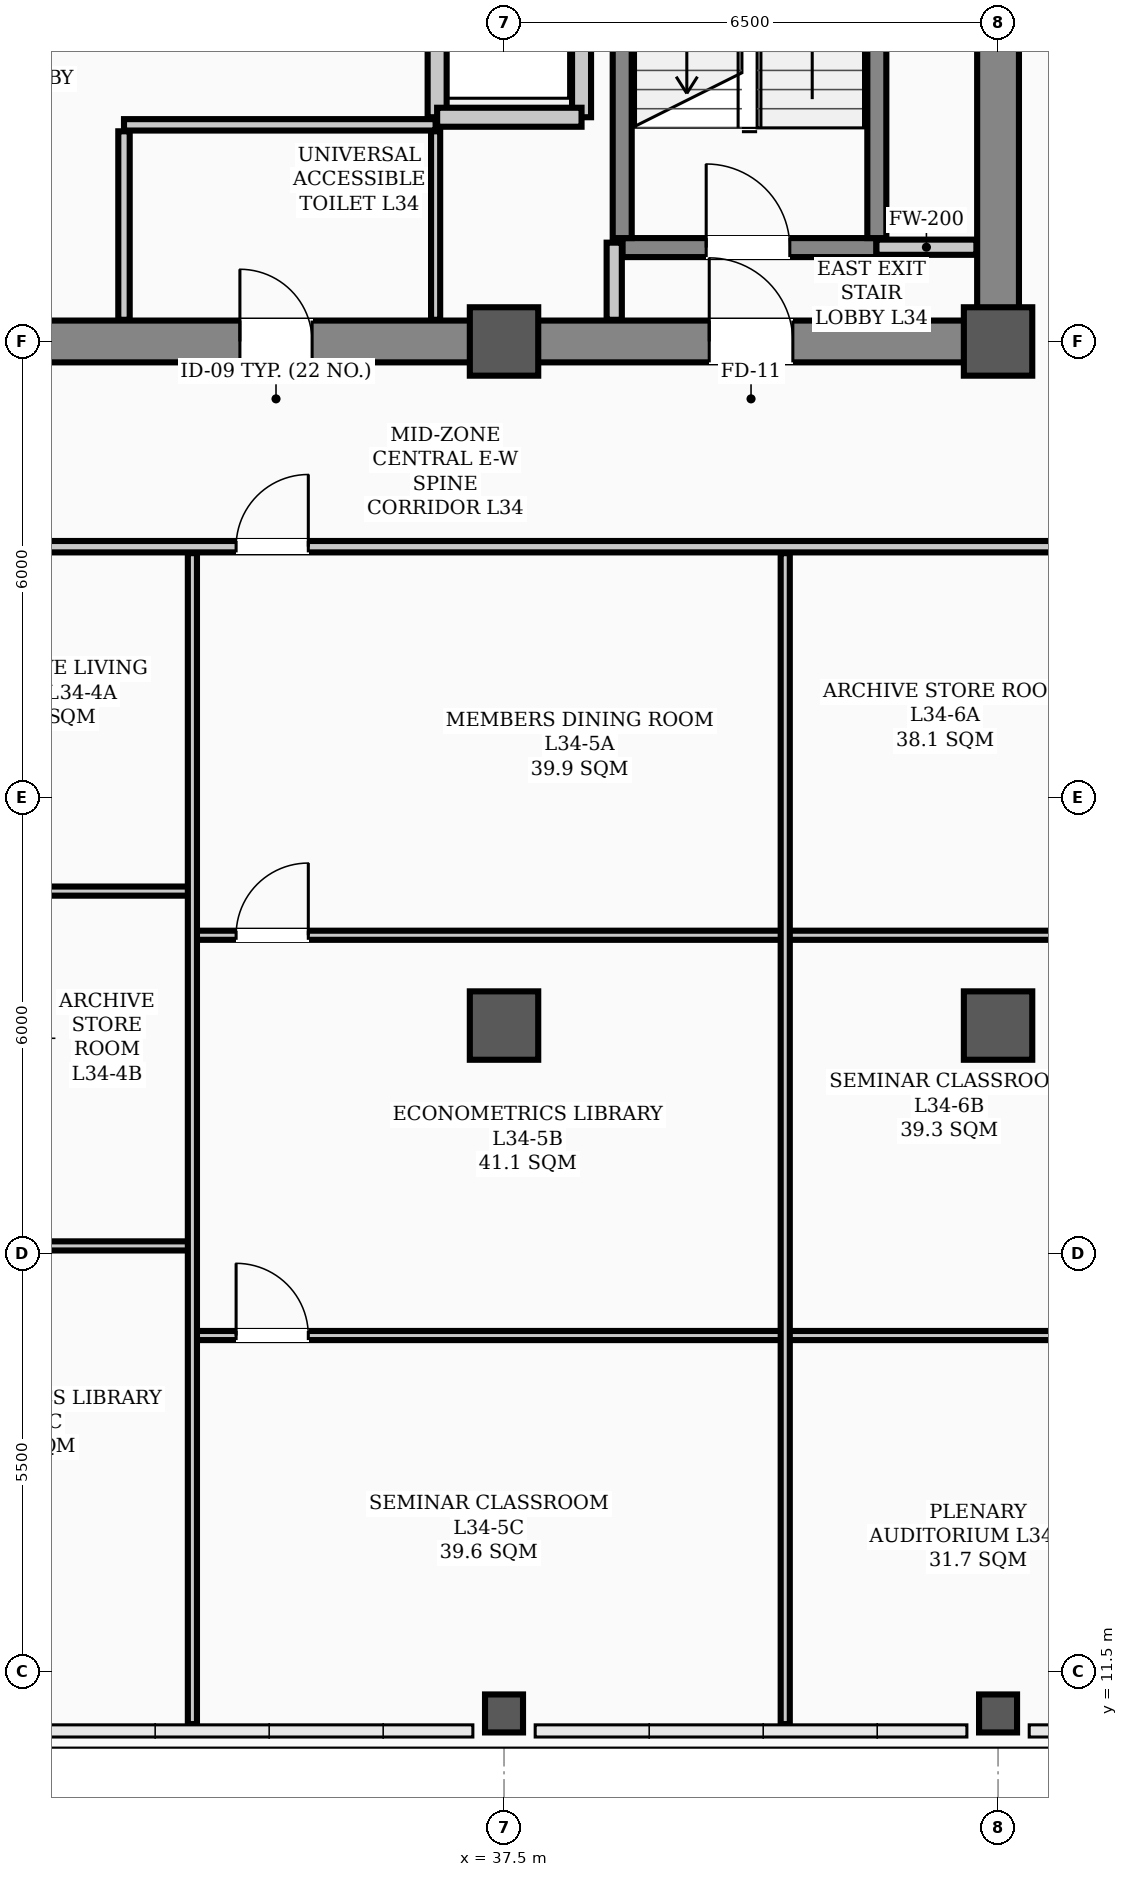
"""IFC4 building model, lengths in metres.
Left out: names, types, materials, properties, quantities, classifications, styles, units other than length and angle.
Written with IfcOpenShell. Run it as: python <this file> out.ifc"""

import sys

from ifc_helpers import new_model, si_unit, direction, frame, frame_2d, origin, origin_2d, place, context, subcontext, project, spatial, rectangle, hollow_rectangle, extrude, element, fill, save


model = new_model("IFC4")
c1 = context("Model", 3, precision=1e-05, world=origin(), true_north=direction((0.0, 1.0)))
c2 = subcontext(c1, "Body", "Model", "MODEL_VIEW")
j1 = project(units=[si_unit("LENGTHUNIT", "METRE"), si_unit("PLANEANGLEUNIT", "RADIAN")], contexts=[c1])
p1 = place(None, origin())
s1 = spatial("IfcSite", under=j1, at=p1, CompositionType="ELEMENT")
p2 = place(p1, origin())
s2 = spatial("IfcBuilding", under=s1, at=p2, CompositionType="ELEMENT")
p3 = place(p2, frame((0.0, 0.0, 138.3)))
s3 = spatial("IfcBuildingStorey", under=s2, at=p3, CompositionType="ELEMENT", Elevation=138.3)
for number, where, z_axis, x_axis in (
    (1, (37.5, 29.0, 0.0), (0.0, 0.0, 1.0), (1.0, 0.0, 0.0)),
    (2, (44.0, 29.0, 0.0), (0.0, 0.0, 1.0), (1.0, 0.0, 0.0)),
    (3, (37.5, 20.0, 0.0), (0.0, 0.0, 1.0), (1.0, 0.0, 0.0)),
    (4, (44.0, 20.0, 0.0), (0.0, 0.0, 1.0), (1.0, 0.0, 0.0)),
):
    element("IfcColumn", number, at=place(p3, frame(where, z_axis=z_axis, x_axis=x_axis)), inside=s3, PredefinedType="COLUMN", context=c2, shape_type="SweptSolid", body=[
        extrude(hollow_rectangle(XDim=0.9, YDim=0.9, WallThickness=0.035, InnerFilletRadius=0.017, OuterFilletRadius=0.052, at=origin_2d()), origin(), (0.0, 0.0, 1.0), 3.9),
    ])
for number, where, z_axis, x_axis in (
    (5, (37.5, 10.95, 0.0), (0.0, 0.0, 1.0), (1.0, 0.0, 0.0)),
    (6, (44.0, 10.95, 0.0), (0.0, 0.0, 1.0), (1.0, 0.0, 0.0)),
):
    element("IfcColumn", number, at=place(p3, frame(where, z_axis=z_axis, x_axis=x_axis)), inside=s3, PredefinedType="COLUMN", context=c2, shape_type="SweptSolid", body=[
        extrude(hollow_rectangle(XDim=0.5, YDim=0.5, WallThickness=0.024, InnerFilletRadius=0.012, OuterFilletRadius=0.036, at=origin_2d()), origin(), (0.0, 0.0, 1.0), 3.66),
    ])
p4 = place(p3, frame((13.5, 29.0, 0.0), z_axis=(0.0, 0.0, 1.0), x_axis=(1.0, 0.0, 0.0)))
e7 = element("IfcWall", 7, at=p4, inside=s3, PredefinedType="SHEAR", context=c2, shape_type="SweptSolid", body=[
    extrude(rectangle(XDim=30.5, YDim=0.55, at=frame_2d((15.25, 0.0))), origin(), (0.0, 0.0, 1.0), 3.66),
])
p5 = place(p4, frame((1.75, 0.0, 0.0)))
e8 = element("IfcOpeningElement", 8, at=p5, cuts=e7, PredefinedType="OPENING", context=c2, shape_type="SweptSolid", body=[
    extrude(rectangle(XDim=1.1, YDim=2.08, at=frame_2d((0.55, 1.04))), frame((0.0, 0.285, 0.0), z_axis=(0.0, -1.0, 0.0), x_axis=(1.0, 0.0, 0.0)), (0.0, 0.0, 1.0), 0.57),
])
p6 = place(p4, frame((26.7, 0.0, 0.0)))
e9 = element("IfcOpeningElement", 9, at=p6, cuts=e7, PredefinedType="OPENING", context=c2, shape_type="SweptSolid", body=[
    extrude(rectangle(XDim=1.1, YDim=2.08, at=frame_2d((0.55, 1.04))), frame((0.0, 0.285, 0.0), z_axis=(0.0, -1.0, 0.0), x_axis=(1.0, 0.0, 0.0)), (0.0, 0.0, 1.0), 0.57),
])
p7 = place(p4, frame((6.8, 0.0, 0.0)))
e10 = element("IfcOpeningElement", 10, at=p7, cuts=e7, PredefinedType="OPENING", context=c2, shape_type="SweptSolid", body=[
    extrude(rectangle(XDim=1.1, YDim=2.08, at=frame_2d((0.55, 1.04))), frame((0.0, 0.285, 0.0), z_axis=(0.0, -1.0, 0.0), x_axis=(1.0, 0.0, 0.0)), (0.0, 0.0, 1.0), 0.57),
])
p8 = place(p4, frame((13.2, 0.0, 0.0)))
e11 = element("IfcOpeningElement", 11, at=p8, cuts=e7, PredefinedType="OPENING", context=c2, shape_type="SweptSolid", body=[
    extrude(rectangle(XDim=1.6, YDim=2.08, at=frame_2d((0.8, 1.04))), frame((0.0, 0.285, 0.0), z_axis=(0.0, -1.0, 0.0), x_axis=(1.0, 0.0, 0.0)), (0.0, 0.0, 1.0), 0.57),
])
p9 = place(p4, frame((20.525, 0.0, 0.0)))
e12 = element("IfcOpeningElement", 12, at=p9, cuts=e7, PredefinedType="OPENING", context=c2, shape_type="SweptSolid", body=[
    extrude(rectangle(XDim=0.95, YDim=2.08, at=frame_2d((0.475, 1.04))), frame((0.0, 0.285, 0.0), z_axis=(0.0, -1.0, 0.0), x_axis=(1.0, 0.0, 0.0)), (0.0, 0.0, 1.0), 0.57),
])
p10 = place(p3, frame((44.0, 29.35, 0.0), z_axis=(0.0, 0.0, 1.0), x_axis=(0.0, 1.0, 0.0)))
e13 = element("IfcWall", 13, at=p10, inside=s3, PredefinedType="SHEAR", context=c2, shape_type="SweptSolid", body=[
    extrude(rectangle(XDim=8.6, YDim=0.55, at=frame_2d((4.3, 0.0))), origin(), (0.0, 0.0, 1.0), 3.66),
])
p11 = place(p3, frame((39.06, 30.235, 0.0), z_axis=(0.0, 0.0, 1.0), x_axis=(1.0, 0.0, 0.0)))
e14 = element("IfcWall", 14, at=p11, inside=s3, PredefinedType="STANDARD", context=c2, shape_type="SweptSolid", body=[
    extrude(rectangle(XDim=3.34, YDim=0.25, at=frame_2d((1.67, 0.0))), origin(), (0.0, 0.0, 1.0), 3.66),
])
p12 = place(p11, frame((1.1, 0.0, 0.0)))
e15 = element("IfcOpeningElement", 15, at=p12, cuts=e14, PredefinedType="OPENING", context=c2, shape_type="SweptSolid", body=[
    extrude(rectangle(XDim=1.1, YDim=2.08, at=frame_2d((0.55, 1.04))), frame((0.0, 0.135, 0.0), z_axis=(0.0, -1.0, 0.0), x_axis=(1.0, 0.0, 0.0)), (0.0, 0.0, 1.0), 0.27),
])
for number, where, z_axis, x_axis in (
    (16, (39.055, 30.36, 0.0), (0.0, 0.0, 1.0), (0.0, 1.0, 0.0)),
    (17, (42.405, 30.36, 0.0), (0.0, 0.0, 1.0), (0.0, 1.0, 0.0)),
):
    element("IfcWall", number, at=place(p3, frame(where, z_axis=z_axis, x_axis=x_axis)), inside=s3, PredefinedType="STANDARD", context=c2, shape_type="SweptSolid", body=[
        extrude(rectangle(XDim=7.184, YDim=0.25, at=frame_2d((3.592, 0.0))), origin(), (0.0, 0.0, 1.0), 3.66),
    ])
p13 = place(p3, frame((36.62, 31.95, 0.0), z_axis=(0.0, 0.0, 1.0), x_axis=(0.0, 1.0, 0.0)))
e18 = element("IfcWall", 18, at=p13, inside=s3, PredefinedType="STANDARD", context=c2, shape_type="SweptSolid", body=[
    extrude(rectangle(XDim=6.0, YDim=0.25, at=frame_2d((3.0, 0.0))), origin(), (0.0, 0.0, 1.0), 2.24),
])
p14 = place(p13, frame((0.9, 0.0, 0.0)))
e19 = element("IfcOpeningElement", 19, at=p14, cuts=e18, PredefinedType="OPENING", context=c2, shape_type="SweptSolid", body=[
    extrude(rectangle(XDim=1.1, YDim=2.08, at=frame_2d((0.55, 1.04))), frame((0.0, 0.135, 0.0), z_axis=(0.0, -1.0, 0.0), x_axis=(1.0, 0.0, 0.0)), (0.0, 0.0, 1.0), 0.27),
])
p15 = place(p13, frame((4.0, 0.0, 0.0)))
e20 = element("IfcOpeningElement", 20, at=p15, cuts=e18, PredefinedType="OPENING", context=c2, shape_type="SweptSolid", body=[
    extrude(rectangle(XDim=1.1, YDim=2.08, at=frame_2d((0.55, 1.04))), frame((0.0, 0.135, 0.0), z_axis=(0.0, -1.0, 0.0), x_axis=(1.0, 0.0, 0.0)), (0.0, 0.0, 1.0), 0.27),
])
p16 = place(p3, frame((38.52, 31.95, 0.0), z_axis=(0.0, 0.0, 1.0), x_axis=(0.0, 1.0, 0.0)))
e21 = element("IfcWall", 21, at=p16, inside=s3, PredefinedType="STANDARD", context=c2, shape_type="SweptSolid", body=[
    extrude(rectangle(XDim=6.0, YDim=0.25, at=frame_2d((3.0, 0.0))), origin(), (0.0, 0.0, 1.0), 2.24),
])
p17 = place(p3, frame((36.62, 31.95, 0.0), z_axis=(0.0, 0.0, 1.0), x_axis=(1.0, 0.0, 0.0)))
e22 = element("IfcWall", 22, at=p17, inside=s3, PredefinedType="STANDARD", context=c2, shape_type="SweptSolid", body=[
    extrude(rectangle(XDim=1.9, YDim=0.25, at=frame_2d((0.95, 0.0))), origin(), (0.0, 0.0, 1.0), 3.48),
])
p18 = place(p3, frame((42.4, 30.24, 0.0), z_axis=(0.0, 0.0, 1.0), x_axis=(1.0, 0.0, 0.0)))
e23 = element("IfcWall", 23, at=p18, inside=s3, PredefinedType="STANDARD", context=c2, shape_type="SweptSolid", body=[
    extrude(rectangle(XDim=1.315, YDim=0.2, at=frame_2d((0.658, 0.0))), origin(), (0.0, 0.0, 1.0), 2.24),
])
p19 = place(p3, frame((32.5, 31.85, 0.0), z_axis=(0.0, 0.0, 1.0), x_axis=(1.0, 0.0, 0.0)))
e24 = element("IfcWall", 24, at=p19, inside=s3, PredefinedType="PARTITIONING", context=c2, shape_type="SweptSolid", body=[
    extrude(rectangle(XDim=4.1, YDim=0.15, at=frame_2d((2.05, 0.0))), origin(), (0.0, 0.0, 1.0), 3.66),
])
p20 = place(p3, frame((2.31, 26.3, 0.0), z_axis=(0.0, 0.0, 1.0), x_axis=(1.0, 0.0, 0.0)))
e25 = element("IfcWall", 25, at=p20, inside=s3, PredefinedType="PARTITIONING", context=c2, shape_type="SweptSolid", body=[
    extrude(rectangle(XDim=46.38, YDim=0.15, at=frame_2d((23.19, 0.0))), origin(), (0.0, 0.0, 1.0), 2.24),
])
p21 = place(p20, frame((12.515, 0.0, 0.0)))
e26 = element("IfcOpeningElement", 26, at=p21, cuts=e25, PredefinedType="OPENING", context=c2, shape_type="SweptSolid", body=[
    extrude(rectangle(XDim=0.95, YDim=2.08, at=frame_2d((0.475, 1.04))), frame((0.0, 0.085, 0.0), z_axis=(0.0, -1.0, 0.0), x_axis=(1.0, 0.0, 0.0)), (0.0, 0.0, 1.0), 0.17),
])
p22 = place(p20, frame((18.615, 0.0, 0.0)))
e27 = element("IfcOpeningElement", 27, at=p22, cuts=e25, PredefinedType="OPENING", context=c2, shape_type="SweptSolid", body=[
    extrude(rectangle(XDim=0.95, YDim=2.08, at=frame_2d((0.475, 1.04))), frame((0.0, 0.085, 0.0), z_axis=(0.0, -1.0, 0.0), x_axis=(1.0, 0.0, 0.0)), (0.0, 0.0, 1.0), 0.17),
])
p23 = place(p20, frame((26.115, 0.0, 0.0)))
e28 = element("IfcOpeningElement", 28, at=p23, cuts=e25, PredefinedType="OPENING", context=c2, shape_type="SweptSolid", body=[
    extrude(rectangle(XDim=0.95, YDim=2.08, at=frame_2d((0.475, 1.04))), frame((0.0, 0.085, 0.0), z_axis=(0.0, -1.0, 0.0), x_axis=(1.0, 0.0, 0.0)), (0.0, 0.0, 1.0), 0.17),
])
p24 = place(p20, frame((31.665, 0.0, 0.0)))
e29 = element("IfcOpeningElement", 29, at=p24, cuts=e25, PredefinedType="OPENING", context=c2, shape_type="SweptSolid", body=[
    extrude(rectangle(XDim=0.95, YDim=2.08, at=frame_2d((0.475, 1.04))), frame((0.0, 0.085, 0.0), z_axis=(0.0, -1.0, 0.0), x_axis=(1.0, 0.0, 0.0)), (0.0, 0.0, 1.0), 0.17),
])
p25 = place(p20, frame((43.06, 0.0, 0.0)))
e30 = element("IfcOpeningElement", 30, at=p25, cuts=e25, PredefinedType="OPENING", context=c2, shape_type="SweptSolid", body=[
    extrude(rectangle(XDim=0.95, YDim=2.08, at=frame_2d((0.475, 1.04))), frame((0.0, 0.085, 0.0), z_axis=(0.0, -1.0, 0.0), x_axis=(1.0, 0.0, 0.0)), (0.0, 0.0, 1.0), 0.17),
])
p26 = place(p3, frame((24.4, 21.769, 0.0), z_axis=(0.0, 0.0, 1.0), x_axis=(1.0, 0.0, 0.0)))
e31 = element("IfcWall", 31, at=p26, inside=s3, PredefinedType="PARTITIONING", context=c2, shape_type="SweptSolid", body=[
    extrude(rectangle(XDim=9.0, YDim=0.12, at=frame_2d((4.5, 0.0))), origin(), (0.0, 0.0, 1.0), 2.24),
])
p27 = place(p26, frame((4.025, 0.0, 0.0)))
e32 = element("IfcOpeningElement", 32, at=p27, cuts=e31, PredefinedType="OPENING", context=c2, shape_type="SweptSolid", body=[
    extrude(rectangle(XDim=0.95, YDim=2.08, at=frame_2d((0.475, 1.04))), frame((0.0, 0.07, 0.0), z_axis=(0.0, -1.0, 0.0), x_axis=(1.0, 0.0, 0.0)), (0.0, 0.0, 1.0), 0.14),
])
p28 = place(p3, frame((24.4, 17.101, 0.0), z_axis=(0.0, 0.0, 1.0), x_axis=(1.0, 0.0, 0.0)))
e33 = element("IfcWall", 33, at=p28, inside=s3, PredefinedType="PARTITIONING", context=c2, shape_type="SweptSolid", body=[
    extrude(rectangle(XDim=9.0, YDim=0.12, at=frame_2d((4.5, 0.0))), origin(), (0.0, 0.0, 1.0), 2.24),
])
p29 = place(p28, frame((4.025, 0.0, 0.0)))
e34 = element("IfcOpeningElement", 34, at=p29, cuts=e33, PredefinedType="OPENING", context=c2, shape_type="SweptSolid", body=[
    extrude(rectangle(XDim=0.95, YDim=2.08, at=frame_2d((0.475, 1.04))), frame((0.0, 0.07, 0.0), z_axis=(0.0, -1.0, 0.0), x_axis=(1.0, 0.0, 0.0)), (0.0, 0.0, 1.0), 0.14),
])
p30 = place(p3, frame((33.4, 21.188, 0.0), z_axis=(0.0, 0.0, 1.0), x_axis=(1.0, 0.0, 0.0)))
e35 = element("IfcWall", 35, at=p30, inside=s3, PredefinedType="PARTITIONING", context=c2, shape_type="SweptSolid", body=[
    extrude(rectangle(XDim=7.8, YDim=0.12, at=frame_2d((3.9, 0.0))), origin(), (0.0, 0.0, 1.0), 2.24),
])
p31 = place(p30, frame((0.575, 0.0, 0.0)))
e36 = element("IfcOpeningElement", 36, at=p31, cuts=e35, PredefinedType="OPENING", context=c2, shape_type="SweptSolid", body=[
    extrude(rectangle(XDim=0.95, YDim=2.08, at=frame_2d((0.475, 1.04))), frame((0.0, 0.07, 0.0), z_axis=(0.0, -1.0, 0.0), x_axis=(1.0, 0.0, 0.0)), (0.0, 0.0, 1.0), 0.14),
])
p32 = place(p3, frame((33.4, 15.922, 0.0), z_axis=(0.0, 0.0, 1.0), x_axis=(1.0, 0.0, 0.0)))
e37 = element("IfcWall", 37, at=p32, inside=s3, PredefinedType="PARTITIONING", context=c2, shape_type="SweptSolid", body=[
    extrude(rectangle(XDim=7.8, YDim=0.12, at=frame_2d((3.9, 0.0))), origin(), (0.0, 0.0, 1.0), 2.24),
])
p33 = place(p32, frame((0.575, 0.0, 0.0)))
e38 = element("IfcOpeningElement", 38, at=p33, cuts=e37, PredefinedType="OPENING", context=c2, shape_type="SweptSolid", body=[
    extrude(rectangle(XDim=0.95, YDim=2.08, at=frame_2d((0.475, 1.04))), frame((0.0, 0.07, 0.0), z_axis=(0.0, -1.0, 0.0), x_axis=(1.0, 0.0, 0.0)), (0.0, 0.0, 1.0), 0.14),
])
p34 = place(p3, frame((41.2, 21.188, 0.0), z_axis=(0.0, 0.0, 1.0), x_axis=(1.0, 0.0, 0.0)))
e39 = element("IfcWall", 39, at=p34, inside=s3, PredefinedType="PARTITIONING", context=c2, shape_type="SweptSolid", body=[
    extrude(rectangle(XDim=7.49, YDim=0.12, at=frame_2d((3.745, 0.0))), origin(), (0.0, 0.0, 1.0), 2.24),
])
p35 = place(p34, frame((4.17, 0.0, 0.0)))
e40 = element("IfcOpeningElement", 40, at=p35, cuts=e39, PredefinedType="OPENING", context=c2, shape_type="SweptSolid", body=[
    extrude(rectangle(XDim=0.95, YDim=2.08, at=frame_2d((0.475, 1.04))), frame((0.0, 0.07, 0.0), z_axis=(0.0, -1.0, 0.0), x_axis=(1.0, 0.0, 0.0)), (0.0, 0.0, 1.0), 0.14),
])
p36 = place(p3, frame((41.2, 15.922, 0.0), z_axis=(0.0, 0.0, 1.0), x_axis=(1.0, 0.0, 0.0)))
e41 = element("IfcWall", 41, at=p36, inside=s3, PredefinedType="PARTITIONING", context=c2, shape_type="SweptSolid", body=[
    extrude(rectangle(XDim=7.49, YDim=0.12, at=frame_2d((3.745, 0.0))), origin(), (0.0, 0.0, 1.0), 2.24),
])
p37 = place(p36, frame((4.17, 0.0, 0.0)))
e42 = element("IfcOpeningElement", 42, at=p37, cuts=e41, PredefinedType="OPENING", context=c2, shape_type="SweptSolid", body=[
    extrude(rectangle(XDim=0.95, YDim=2.08, at=frame_2d((0.475, 1.04))), frame((0.0, 0.07, 0.0), z_axis=(0.0, -1.0, 0.0), x_axis=(1.0, 0.0, 0.0)), (0.0, 0.0, 1.0), 0.14),
])
p38 = place(p3, frame((38.95, 29.285, 0.0), z_axis=(0.0, 0.0, 1.0), x_axis=(0.0, 1.0, 0.0)))
e43 = element("IfcWall", 43, at=p38, inside=s3, PredefinedType="STANDARD", context=c2, shape_type="SweptSolid", body=[
    extrude(rectangle(XDim=1.015, YDim=0.2, at=frame_2d((0.508, 0.0))), origin(), (0.0, 0.0, 1.0), 2.24),
])
p39 = place(p3, frame((32.5, 29.285, 0.0), z_axis=(0.0, 0.0, 1.0), x_axis=(0.0, 1.0, 0.0)))
e44 = element("IfcWall", 44, at=p39, inside=s3, PredefinedType="PARTITIONING", context=c2, shape_type="SweptSolid", body=[
    extrude(rectangle(XDim=2.48, YDim=0.15, at=frame_2d((1.24, 0.0))), origin(), (0.0, 0.0, 1.0), 2.24),
])
p40 = place(p3, frame((36.6, 29.285, 0.0), z_axis=(0.0, 0.0, 1.0), x_axis=(0.0, 1.0, 0.0)))
e45 = element("IfcWall", 45, at=p40, inside=s3, PredefinedType="PARTITIONING", context=c2, shape_type="SweptSolid", body=[
    extrude(rectangle(XDim=2.48, YDim=0.12, at=frame_2d((1.24, 0.0))), origin(), (0.0, 0.0, 1.0), 2.24),
])
for number, where, z_axis, x_axis in (
    (46, (33.4, 10.81, 0.0), (0.0, 0.0, 1.0), (0.0, 1.0, 0.0)),
    (47, (41.2, 10.81, 0.0), (0.0, 0.0, 1.0), (0.0, 1.0, 0.0)),
):
    element("IfcWall", number, at=place(p3, frame(where, z_axis=z_axis, x_axis=x_axis)), inside=s3, PredefinedType="PARTITIONING", context=c2, shape_type="SweptSolid", body=[
        extrude(rectangle(XDim=15.405, YDim=0.12, at=frame_2d((7.703, 0.0))), origin(), (0.0, 0.0, 1.0), 2.24),
    ])
p41 = place(p12, origin())
e48 = element("IfcDoor", 48, at=p41, inside=s3, OperationType="SINGLE_SWING_LEFT", PredefinedType="DOOR", context=c2, shape_type="SweptSolid", body=[
    extrude(rectangle(XDim=1.1, YDim=2.08, at=frame_2d((0.55, 1.04))), frame((0.0, 0.025, 0.0), z_axis=(0.0, -1.0, 0.0), x_axis=(1.0, 0.0, 0.0)), (0.0, 0.0, 1.0), 0.05),
])
fill(e15, e48)
p42 = place(p6, origin())
e49 = element("IfcDoor", 49, at=p42, inside=s3, OperationType="SINGLE_SWING_LEFT", PredefinedType="DOOR", context=c2, shape_type="SweptSolid", body=[
    extrude(rectangle(XDim=1.1, YDim=2.08, at=frame_2d((0.55, 1.04))), frame((0.0, 0.025, 0.0), z_axis=(0.0, -1.0, 0.0), x_axis=(1.0, 0.0, 0.0)), (0.0, 0.0, 1.0), 0.05),
])
fill(e9, e49)
p43 = place(p9, origin())
e50 = element("IfcDoor", 50, at=p43, inside=s3, OperationType="SINGLE_SWING_LEFT", PredefinedType="DOOR", context=c2, shape_type="SweptSolid", body=[
    extrude(rectangle(XDim=0.95, YDim=2.08, at=frame_2d((0.475, 1.04))), frame((0.0, 0.025, 0.0), z_axis=(0.0, -1.0, 0.0), x_axis=(1.0, 0.0, 0.0)), (0.0, 0.0, 1.0), 0.05),
])
fill(e12, e50)
p44 = place(p31, origin())
e51 = element("IfcDoor", 51, at=p44, inside=s3, OperationType="SINGLE_SWING_RIGHT", PredefinedType="DOOR", context=c2, shape_type="SweptSolid", body=[
    extrude(rectangle(XDim=0.95, YDim=2.08, at=frame_2d((0.475, 1.04))), frame((0.0, 0.025, 0.0), z_axis=(0.0, -1.0, 0.0), x_axis=(1.0, 0.0, 0.0)), (0.0, 0.0, 1.0), 0.05),
])
fill(e36, e51)
p45 = place(p33, origin())
e52 = element("IfcDoor", 52, at=p45, inside=s3, OperationType="SINGLE_SWING_LEFT", PredefinedType="DOOR", context=c2, shape_type="SweptSolid", body=[
    extrude(rectangle(XDim=0.95, YDim=2.08, at=frame_2d((0.475, 1.04))), frame((0.0, 0.025, 0.0), z_axis=(0.0, -1.0, 0.0), x_axis=(1.0, 0.0, 0.0)), (0.0, 0.0, 1.0), 0.05),
])
fill(e38, e52)
p46 = place(p24, origin())
e53 = element("IfcDoor", 53, at=p46, inside=s3, OperationType="SINGLE_SWING_RIGHT", PredefinedType="DOOR", context=c2, shape_type="SweptSolid", body=[
    extrude(rectangle(XDim=0.95, YDim=2.08, at=frame_2d((0.475, 1.04))), frame((0.0, 0.025, 0.0), z_axis=(0.0, -1.0, 0.0), x_axis=(1.0, 0.0, 0.0)), (0.0, 0.0, 1.0), 0.05),
])
fill(e29, e53)
save(model, sys.argv[1])
